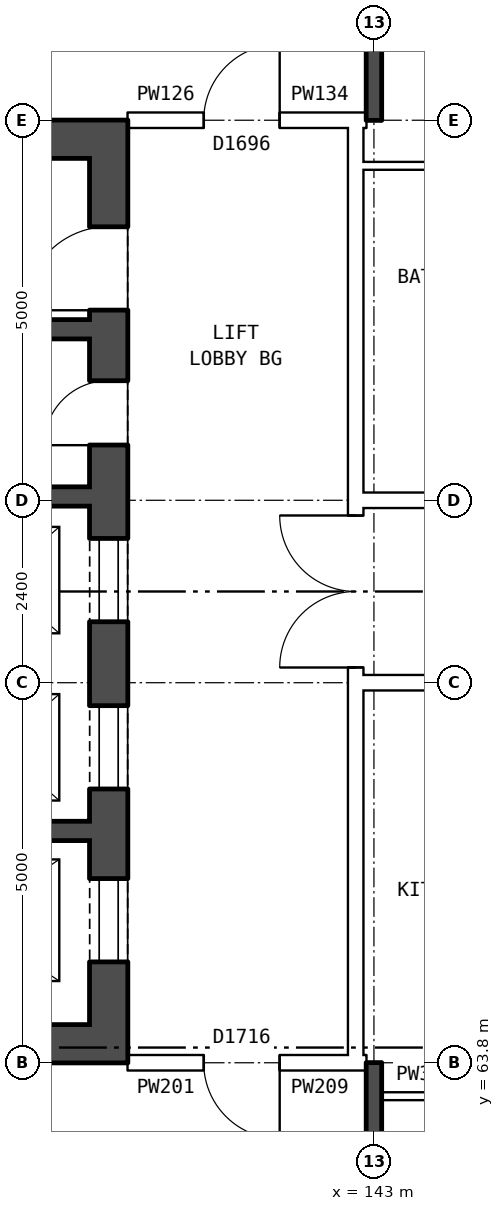
"""IFC4 building model, lengths in metres.
Left out: names, types, materials, properties, quantities, classifications, styles, units other than length and angle.
Written with IfcOpenShell. Run it as: python <this file> out.ifc"""

import sys

from ifc_helpers import new_model, si_unit, direction, frame, frame_2d, origin, place, context, subcontext, project, spatial, rectangle, extrude, element, fill, save


model = new_model("IFC4")
c1 = context("Model", 3, precision=1e-05, world=origin(), true_north=direction((0.0, 1.0)))
c2 = subcontext(c1, "Body", "Model", "MODEL_VIEW")
j1 = project(units=[si_unit("LENGTHUNIT", "METRE"), si_unit("PLANEANGLEUNIT", "RADIAN")], contexts=[c1])
p1 = place(None, origin())
s1 = spatial("IfcSite", under=j1, at=p1, CompositionType="ELEMENT")
p2 = place(p1, origin())
s2 = spatial("IfcBuilding", under=s1, at=p2, CompositionType="ELEMENT")
p3 = place(p2, frame((0.0, 0.0, 160.9)))
s3 = spatial("IfcBuildingStorey", under=s2, at=p3, CompositionType="ELEMENT", Elevation=160.9)
p4 = place(p3, frame((139.51, 63.8, 0.0), z_axis=(0.0, 0.0, 1.0), x_axis=(0.0, 1.0, 0.0)))
e1 = element("IfcWall", 1, at=p4, inside=s3, PredefinedType="SHEAR", context=c2, shape_type="SweptSolid", body=[
    extrude(rectangle(XDim=12.4, YDim=0.5, at=frame_2d((6.2, 0.0))), origin(), (0.0, 0.0, 1.0), 2.85),
])
p5 = place(p4, frame((1.325, 0.0, 0.0)))
e2 = element("IfcOpeningElement", 2, at=p5, cuts=e1, PredefinedType="OPENING", context=c2, shape_type="SweptSolid", body=[
    extrude(rectangle(XDim=1.1, YDim=2.1, at=frame_2d((0.55, 1.05))), frame((0.0, 0.26, 0.0), z_axis=(0.0, -1.0, 0.0), x_axis=(1.0, 0.0, 0.0)), (0.0, 0.0, 1.0), 0.52),
])
p6 = place(p4, frame((3.6, 0.0, 0.0)))
e3 = element("IfcOpeningElement", 3, at=p6, cuts=e1, PredefinedType="OPENING", context=c2, shape_type="SweptSolid", body=[
    extrude(rectangle(XDim=1.1, YDim=2.1, at=frame_2d((0.55, 1.05))), frame((0.0, 0.26, 0.0), z_axis=(0.0, -1.0, 0.0), x_axis=(1.0, 0.0, 0.0)), (0.0, 0.0, 1.0), 0.52),
])
p7 = place(p4, frame((5.8, 0.0, 0.0)))
e4 = element("IfcOpeningElement", 4, at=p7, cuts=e1, PredefinedType="OPENING", context=c2, shape_type="SweptSolid", body=[
    extrude(rectangle(XDim=1.1, YDim=2.1, at=frame_2d((0.55, 1.05))), frame((0.0, 0.26, 0.0), z_axis=(0.0, -1.0, 0.0), x_axis=(1.0, 0.0, 0.0)), (0.0, 0.0, 1.0), 0.52),
])
p8 = place(p4, frame((9.9, 0.0, 0.0)))
e5 = element("IfcOpeningElement", 5, at=p8, cuts=e1, PredefinedType="OPENING", context=c2, shape_type="SweptSolid", body=[
    extrude(rectangle(XDim=1.1, YDim=2.1, at=frame_2d((0.55, 1.05))), frame((0.0, 0.26, 0.0), z_axis=(0.0, -1.0, 0.0), x_axis=(1.0, 0.0, 0.0)), (0.0, 0.0, 1.0), 0.52),
])
p9 = place(p4, frame((8.125, 0.0, 0.0)))
e6 = element("IfcOpeningElement", 6, at=p9, cuts=e1, PredefinedType="OPENING", context=c2, shape_type="SweptSolid", body=[
    extrude(rectangle(XDim=0.85, YDim=2.1, at=frame_2d((0.425, 1.05))), frame((0.0, 0.26, 0.0), z_axis=(0.0, -1.0, 0.0), x_axis=(1.0, 0.0, 0.0)), (0.0, 0.0, 1.0), 0.52),
])
for number, where, z_axis, x_axis in (
    (7, (139.26, 64.05, 0.0), (0.0, 0.0, 1.0), (-1.0, 0.0, 0.0)),
    (8, (139.26, 75.95, 0.0), (0.0, 0.0, 1.0), (-1.0, 0.0, 0.0)),
):
    element("IfcWall", number, at=place(p3, frame(where, z_axis=z_axis, x_axis=x_axis)), inside=s3, PredefinedType="SHEAR", context=c2, shape_type="SweptSolid", body=[
        extrude(rectangle(XDim=7.4, YDim=0.5, at=frame_2d((3.7, 0.0))), origin(), (0.0, 0.0, 1.0), 2.85),
    ])
p10 = place(p3, frame((139.26, 66.85, 0.0), z_axis=(0.0, 0.0, 1.0), x_axis=(-1.0, 0.0, 0.0)))
e9 = element("IfcWall", 9, at=p10, inside=s3, PredefinedType="SHEAR", context=c2, shape_type="SweptSolid", body=[
    extrude(rectangle(XDim=4.575, YDim=0.25, at=frame_2d((2.288, 0.0))), origin(), (0.0, 0.0, 1.0), 2.85),
])
p11 = place(p3, frame((139.26, 71.25, 0.0), z_axis=(0.0, 0.0, 1.0), x_axis=(-1.0, 0.0, 0.0)))
e10 = element("IfcWall", 10, at=p11, inside=s3, PredefinedType="SHEAR", context=c2, shape_type="SweptSolid", body=[
    extrude(rectangle(XDim=7.4, YDim=0.25, at=frame_2d((3.7, 0.0))), origin(), (0.0, 0.0, 1.0), 2.85),
])
p12 = place(p11, frame((4.975, 0.0, 0.0)))
e11 = element("IfcOpeningElement", 11, at=p12, cuts=e10, PredefinedType="OPENING", context=c2, shape_type="SweptSolid", body=[
    extrude(rectangle(XDim=1.1, YDim=2.1, at=frame_2d((0.55, 1.05))), frame((0.0, 0.135, 0.0), z_axis=(0.0, -1.0, 0.0), x_axis=(1.0, 0.0, 0.0)), (0.0, 0.0, 1.0), 0.27),
])
p13 = place(p11, frame((2.875, 0.0, 0.0)))
e12 = element("IfcOpeningElement", 12, at=p13, cuts=e10, PredefinedType="OPENING", context=c2, shape_type="SweptSolid", body=[
    extrude(rectangle(XDim=0.85, YDim=2.1, at=frame_2d((0.425, 1.05))), frame((0.0, 0.135, 0.0), z_axis=(0.0, -1.0, 0.0), x_axis=(1.0, 0.0, 0.0)), (0.0, 0.0, 1.0), 0.27),
])
p14 = place(p3, frame((139.26, 73.45, 0.0), z_axis=(0.0, 0.0, 1.0), x_axis=(-1.0, 0.0, 0.0)))
e13 = element("IfcWall", 13, at=p14, inside=s3, PredefinedType="SHEAR", context=c2, shape_type="SweptSolid", body=[
    extrude(rectangle(XDim=2.425, YDim=0.25, at=frame_2d((1.212, 0.0))), origin(), (0.0, 0.0, 1.0), 2.85),
])
p15 = place(p3, frame((142.76, 63.9, 0.0), z_axis=(0.0, 0.0, 1.0), x_axis=(0.0, 1.0, 0.0)))
e14 = element("IfcWall", 14, at=p15, inside=s3, PredefinedType="PARTITIONING", context=c2, shape_type="SweptSolid", body=[
    extrude(rectangle(XDim=12.2, YDim=0.2, at=frame_2d((6.1, 0.0))), origin(), (0.0, 0.0, 1.0), 2.85),
])
p16 = place(p15, frame((5.1, 0.0, 0.0)))
e15 = element("IfcOpeningElement", 15, at=p16, cuts=e14, PredefinedType="OPENING", context=c2, shape_type="SweptSolid", body=[
    extrude(rectangle(XDim=2.0, YDim=2.1, at=frame_2d((1.0, 1.05))), frame((0.0, 0.11, 0.0), z_axis=(0.0, -1.0, 0.0), x_axis=(1.0, 0.0, 0.0)), (0.0, 0.0, 1.0), 0.22),
])
p17 = place(p3, frame((143.1, 63.36, 0.0), z_axis=(0.0, 0.0, 1.0), x_axis=(1.0, 0.0, 0.0)))
e16 = element("IfcWall", 16, at=p17, inside=s3, PredefinedType="PARTITIONING", context=c2, shape_type="SweptSolid", body=[
    extrude(rectangle(XDim=2.9, YDim=0.1, at=frame_2d((1.45, 0.0))), origin(), (0.0, 0.0, 1.0), 2.85),
])
p18 = place(p17, frame((1.0, 0.0, 0.0)))
e17 = element("IfcOpeningElement", 17, at=p18, cuts=e16, PredefinedType="OPENING", context=c2, shape_type="SweptSolid", body=[
    extrude(rectangle(XDim=0.9, YDim=2.1, at=frame_2d((0.45, 1.05))), frame((0.0, 0.06, 0.0), z_axis=(0.0, -1.0, 0.0), x_axis=(1.0, 0.0, 0.0)), (0.0, 0.0, 1.0), 0.12),
])
p19 = place(p3, frame((139.76, 63.8, 0.0), z_axis=(0.0, 0.0, 1.0), x_axis=(1.0, 0.0, 0.0)))
e18 = element("IfcWall", 18, at=p19, inside=s3, PredefinedType="PARTITIONING", context=c2, shape_type="SweptSolid", body=[
    extrude(rectangle(XDim=3.0, YDim=0.2, at=frame_2d((1.5, 0.0))), origin(), (0.0, 0.0, 1.0), 2.85),
])
p20 = place(p19, frame((1.0, 0.0, 0.0)))
e19 = element("IfcOpeningElement", 19, at=p20, cuts=e18, PredefinedType="OPENING", context=c2, shape_type="SweptSolid", body=[
    extrude(rectangle(XDim=1.0, YDim=2.1, at=frame_2d((0.5, 1.05))), frame((0.0, 0.11, 0.0), z_axis=(0.0, -1.0, 0.0), x_axis=(1.0, 0.0, 0.0)), (0.0, 0.0, 1.0), 0.22),
])
p21 = place(p3, frame((142.76, 63.8, 0.0), z_axis=(0.0, 0.0, 1.0), x_axis=(1.0, 0.0, 0.0)))
e20 = element("IfcWall", 20, at=p21, inside=s3, PredefinedType="PARTITIONING", context=c2, shape_type="SweptSolid", body=[
    extrude(rectangle(XDim=0.14, YDim=0.2, at=frame_2d((0.07, 0.0))), origin(), (0.0, 0.0, 1.0), 2.85),
])
p22 = place(p3, frame((142.76, 68.8, 0.0), z_axis=(0.0, 0.0, 1.0), x_axis=(1.0, 0.0, 0.0)))
e21 = element("IfcWall", 21, at=p22, inside=s3, PredefinedType="PARTITIONING", context=c2, shape_type="SweptSolid", body=[
    extrude(rectangle(XDim=14.48, YDim=0.2, at=frame_2d((7.24, 0.0))), origin(), (0.0, 0.0, 1.0), 2.85),
])
p23 = place(p22, frame((1.12, 0.0, 0.0)))
e22 = element("IfcOpeningElement", 22, at=p23, cuts=e21, PredefinedType="OPENING", context=c2, shape_type="SweptSolid", body=[
    extrude(rectangle(XDim=1.0, YDim=2.1, at=frame_2d((0.5, 1.05))), frame((0.0, 0.11, 0.0), z_axis=(0.0, -1.0, 0.0), x_axis=(1.0, 0.0, 0.0)), (0.0, 0.0, 1.0), 0.22),
])
p24 = place(p22, frame((7.24, 0.0, 0.0)))
e23 = element("IfcOpeningElement", 23, at=p24, cuts=e21, PredefinedType="OPENING", context=c2, shape_type="SweptSolid", body=[
    extrude(rectangle(XDim=1.0, YDim=2.1, at=frame_2d((0.5, 1.05))), frame((0.0, 0.11, 0.0), z_axis=(0.0, -1.0, 0.0), x_axis=(1.0, 0.0, 0.0)), (0.0, 0.0, 1.0), 0.22),
])
p25 = place(p3, frame((142.76, 71.2, 0.0), z_axis=(0.0, 0.0, 1.0), x_axis=(1.0, 0.0, 0.0)))
e24 = element("IfcWall", 24, at=p25, inside=s3, PredefinedType="PARTITIONING", context=c2, shape_type="SweptSolid", body=[
    extrude(rectangle(XDim=14.48, YDim=0.2, at=frame_2d((7.24, 0.0))), origin(), (0.0, 0.0, 1.0), 2.85),
])
p26 = place(p25, frame((4.24, 0.0, 0.0)))
e25 = element("IfcOpeningElement", 25, at=p26, cuts=e24, PredefinedType="OPENING", context=c2, shape_type="SweptSolid", body=[
    extrude(rectangle(XDim=1.0, YDim=2.1, at=frame_2d((0.5, 1.05))), frame((0.0, 0.11, 0.0), z_axis=(0.0, -1.0, 0.0), x_axis=(1.0, 0.0, 0.0)), (0.0, 0.0, 1.0), 0.22),
])
p27 = place(p25, frame((7.24, 0.0, 0.0)))
e26 = element("IfcOpeningElement", 26, at=p27, cuts=e24, PredefinedType="OPENING", context=c2, shape_type="SweptSolid", body=[
    extrude(rectangle(XDim=1.0, YDim=2.1, at=frame_2d((0.5, 1.05))), frame((0.0, 0.11, 0.0), z_axis=(0.0, -1.0, 0.0), x_axis=(1.0, 0.0, 0.0)), (0.0, 0.0, 1.0), 0.22),
])
p28 = place(p3, frame((142.76, 75.6, 0.0), z_axis=(0.0, 0.0, 1.0), x_axis=(1.0, 0.0, 0.0)))
e27 = element("IfcWall", 27, at=p28, inside=s3, PredefinedType="PARTITIONING", context=c2, shape_type="SweptSolid", body=[
    extrude(rectangle(XDim=3.24, YDim=0.1, at=frame_2d((1.62, 0.0))), origin(), (0.0, 0.0, 1.0), 2.85),
])
p29 = place(p3, frame((139.76, 76.2, 0.0), z_axis=(0.0, 0.0, 1.0), x_axis=(1.0, 0.0, 0.0)))
e28 = element("IfcWall", 28, at=p29, inside=s3, PredefinedType="PARTITIONING", context=c2, shape_type="SweptSolid", body=[
    extrude(rectangle(XDim=3.0, YDim=0.2, at=frame_2d((1.5, 0.0))), origin(), (0.0, 0.0, 1.0), 2.85),
])
p30 = place(p29, frame((1.0, 0.0, 0.0)))
e29 = element("IfcOpeningElement", 29, at=p30, cuts=e28, PredefinedType="OPENING", context=c2, shape_type="SweptSolid", body=[
    extrude(rectangle(XDim=1.0, YDim=2.1, at=frame_2d((0.5, 1.05))), frame((0.0, 0.11, 0.0), z_axis=(0.0, -1.0, 0.0), x_axis=(1.0, 0.0, 0.0)), (0.0, 0.0, 1.0), 0.22),
])
p31 = place(p3, frame((142.76, 76.2, 0.0), z_axis=(0.0, 0.0, 1.0), x_axis=(1.0, 0.0, 0.0)))
e30 = element("IfcWall", 30, at=p31, inside=s3, PredefinedType="PARTITIONING", context=c2, shape_type="SweptSolid", body=[
    extrude(rectangle(XDim=0.14, YDim=0.2, at=frame_2d((0.07, 0.0))), origin(), (0.0, 0.0, 1.0), 2.85),
])
for number, where, z_axis, x_axis in (
    (31, (143.0, 54.36, 0.0), (0.0, 0.0, 1.0), (0.0, 1.0, 0.0)),
    (32, (143.0, 76.2, 0.0), (0.0, 0.0, 1.0), (0.0, 1.0, 0.0)),
):
    element("IfcWall", number, at=place(p3, frame(where, z_axis=z_axis, x_axis=x_axis)), inside=s3, PredefinedType="SOLIDWALL", context=c2, shape_type="SweptSolid", body=[
        extrude(rectangle(XDim=9.44, YDim=0.2, at=frame_2d((4.72, 0.0))), origin(), (0.0, 0.0, 1.0), 2.85),
    ])
p32 = place(p5, origin())
e33 = element("IfcDoor", 33, at=p32, inside=s3, OperationType="DOUBLE_DOOR_SLIDING", PredefinedType="DOOR", context=c2, shape_type="SweptSolid", body=[
    extrude(rectangle(XDim=1.1, YDim=2.1, at=frame_2d((0.55, 1.05))), frame((0.0, 0.235, 0.0), z_axis=(0.0, -1.0, 0.0), x_axis=(1.0, 0.0, 0.0)), (0.0, 0.0, 1.0), 0.05),
])
fill(e2, e33)
p33 = place(p6, origin())
e34 = element("IfcDoor", 34, at=p33, inside=s3, OperationType="DOUBLE_DOOR_SLIDING", PredefinedType="DOOR", context=c2, shape_type="SweptSolid", body=[
    extrude(rectangle(XDim=1.1, YDim=2.1, at=frame_2d((0.55, 1.05))), frame((0.0, 0.235, 0.0), z_axis=(0.0, -1.0, 0.0), x_axis=(1.0, 0.0, 0.0)), (0.0, 0.0, 1.0), 0.05),
])
fill(e3, e34)
p34 = place(p7, origin())
e35 = element("IfcDoor", 35, at=p34, inside=s3, OperationType="DOUBLE_DOOR_SLIDING", PredefinedType="DOOR", context=c2, shape_type="SweptSolid", body=[
    extrude(rectangle(XDim=1.1, YDim=2.1, at=frame_2d((0.55, 1.05))), frame((0.0, 0.235, 0.0), z_axis=(0.0, -1.0, 0.0), x_axis=(1.0, 0.0, 0.0)), (0.0, 0.0, 1.0), 0.05),
])
fill(e4, e35)
p35 = place(p8, origin())
e36 = element("IfcDoor", 36, at=p35, inside=s3, OperationType="SINGLE_SWING_LEFT", PredefinedType="DOOR", context=c2, shape_type="SweptSolid", body=[
    extrude(rectangle(XDim=1.1, YDim=2.1, at=frame_2d((0.55, 1.05))), frame((0.0, 0.235, 0.0), z_axis=(0.0, -1.0, 0.0), x_axis=(1.0, 0.0, 0.0)), (0.0, 0.0, 1.0), 0.05),
])
fill(e5, e36)
p36 = place(p9, origin())
e37 = element("IfcDoor", 37, at=p36, inside=s3, OperationType="SINGLE_SWING_LEFT", PredefinedType="DOOR", context=c2, shape_type="SweptSolid", body=[
    extrude(rectangle(XDim=0.85, YDim=2.1, at=frame_2d((0.425, 1.05))), frame((0.0, 0.235, 0.0), z_axis=(0.0, -1.0, 0.0), x_axis=(1.0, 0.0, 0.0)), (0.0, 0.0, 1.0), 0.05),
])
fill(e6, e37)
p37 = place(p16, origin())
e38 = element("IfcDoor", 38, at=p37, inside=s3, OperationType="DOUBLE_DOOR_SINGLE_SWING", PredefinedType="DOOR", context=c2, shape_type="SweptSolid", body=[
    extrude(rectangle(XDim=2.0, YDim=2.1, at=frame_2d((1.0, 1.05))), frame((0.0, 0.025, 0.0), z_axis=(0.0, -1.0, 0.0), x_axis=(1.0, 0.0, 0.0)), (0.0, 0.0, 1.0), 0.05),
])
fill(e15, e38)
p38 = place(p20, frame((1.0, 0.0, 0.0), z_axis=(0.0, 0.0, 1.0), x_axis=(-1.0, 0.0, 0.0)))
e39 = element("IfcDoor", 39, at=p38, inside=s3, OperationType="SINGLE_SWING_LEFT", PredefinedType="DOOR", context=c2, shape_type="SweptSolid", body=[
    extrude(rectangle(XDim=1.0, YDim=2.1, at=frame_2d((0.5, 1.05))), frame((0.0, 0.025, 0.0), z_axis=(0.0, -1.0, 0.0), x_axis=(1.0, 0.0, 0.0)), (0.0, 0.0, 1.0), 0.05),
])
fill(e19, e39)
p39 = place(p30, origin())
e40 = element("IfcDoor", 40, at=p39, inside=s3, OperationType="SINGLE_SWING_RIGHT", PredefinedType="DOOR", context=c2, shape_type="SweptSolid", body=[
    extrude(rectangle(XDim=1.0, YDim=2.1, at=frame_2d((0.5, 1.05))), frame((0.0, 0.025, 0.0), z_axis=(0.0, -1.0, 0.0), x_axis=(1.0, 0.0, 0.0)), (0.0, 0.0, 1.0), 0.05),
])
fill(e29, e40)
save(model, sys.argv[1])
